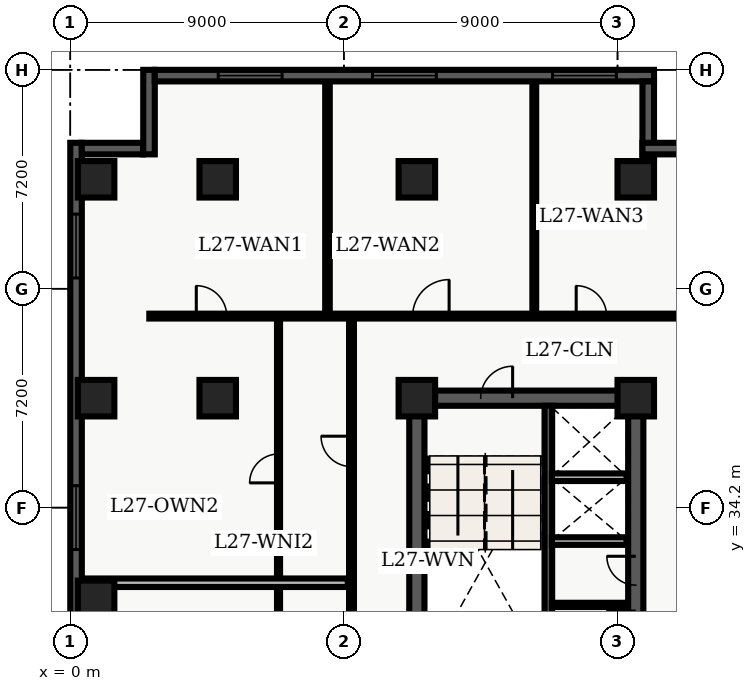
"""IFC4 building model, lengths in metres.
Left out: names, types, materials, properties, quantities, classifications, styles, units other than length and angle.
Written with IfcOpenShell. Run it as: python <this file> out.ifc"""

import sys

from ifc_helpers import new_model, entity, si_unit, converted_unit, direction, frame, origin_with_axes, origin_2d_with_axis, place, context, subcontext, project, spatial, polyline, rectangle, outline, extrude, element, fill, save


model = new_model("IFC4")
c1 = context("Model", 3, precision=1e-05, world=origin_with_axes(), true_north=direction((0.0, 1.0)))
c2 = subcontext(c1, "Body", "Model", "MODEL_VIEW")
j1 = project(units=[si_unit("LENGTHUNIT", "METRE"), converted_unit("PLANEANGLEUNIT", "DEGREE", entity("IfcPlaneAngleMeasure", 0.017), si_unit("PLANEANGLEUNIT", "RADIAN"), dimensions=[0, 0, 0, 0, 0, 0, 0])], contexts=[c1])
p1 = place(None, origin_with_axes())
s1 = spatial("IfcSite", under=j1, at=p1, CompositionType="ELEMENT")
p2 = place(p1, origin_with_axes())
s2 = spatial("IfcBuilding", under=s1, at=p2, CompositionType="ELEMENT")
p3 = place(p2, frame((0.0, 0.0, 112.5), z_axis=(0.0, 0.0, 1.0), x_axis=(1.0, 0.0, 0.0)))
s3 = spatial("IfcBuildingStorey", under=s2, at=p3, CompositionType="ELEMENT", Elevation=112.5)
p4 = place(p3, frame((11.4, 10.8, 0.0), z_axis=(0.0, 0.0, 1.0), x_axis=(0.0, 1.0, 0.0)))
e1 = element("IfcWall", 1, at=p4, inside=s3, PredefinedType="SHEAR", context=c2, shape_type="SweptSolid", body=[
    extrude(outline(polyline([(0.0, -0.25), (27.0, -0.25), (27.0, 0.25), (0.0, 0.25), (0.0, -0.25)])), origin_with_axes(), (0.0, 0.0, 1.0), 3.66),
])
p5 = place(p3, frame((11.4, 37.8, 0.0), z_axis=(0.0, 0.0, 1.0), x_axis=(1.0, 0.0, 0.0)))
e2 = element("IfcWall", 2, at=p5, inside=s3, PredefinedType="SHEAR", context=c2, shape_type="SweptSolid", body=[
    extrude(outline(polyline([(0.0, -0.25), (7.2, -0.25), (7.2, 0.25), (0.0, 0.25), (0.0, -0.25)])), origin_with_axes(), (0.0, 0.0, 1.0), 3.66),
])
p6 = place(p5, frame((2.625, 0.0, 0.0), z_axis=(0.0, 0.0, 1.0), x_axis=(1.0, 0.0, 0.0)))
e3 = element("IfcOpeningElement", 3, at=p6, cuts=e2, PredefinedType="OPENING", context=c2, shape_type="SweptSolid", body=[
    extrude(rectangle(XDim=1.05, YDim=0.52, at=origin_2d_with_axis()), origin_with_axes(), (0.0, 0.0, 1.0), 2.15),
])
p7 = place(p3, frame((18.6, 24.3, 0.0), z_axis=(0.0, 0.0, 1.0), x_axis=(0.0, 1.0, 0.0)))
e4 = element("IfcWall", 4, at=p7, inside=s3, PredefinedType="SHEAR", context=c2, shape_type="SweptSolid", body=[
    extrude(outline(polyline([(0.0, -0.25), (13.5, -0.25), (13.5, 0.25), (0.0, 0.25), (0.0, -0.25)])), origin_with_axes(), (0.0, 0.0, 1.0), 3.66),
])
p8 = place(p7, frame((6.025, 0.0, 0.0), z_axis=(0.0, 0.0, 1.0), x_axis=(1.0, 0.0, 0.0)))
e5 = element("IfcOpeningElement", 5, at=p8, cuts=e4, PredefinedType="OPENING", context=c2, shape_type="SweptSolid", body=[
    extrude(rectangle(XDim=0.95, YDim=0.52, at=origin_2d_with_axis()), origin_with_axes(), (0.0, 0.0, 1.0), 2.15),
])
p9 = place(p7, frame((7.825, 0.0, 0.0), z_axis=(0.0, 0.0, 1.0), x_axis=(1.0, 0.0, 0.0)))
e6 = element("IfcOpeningElement", 6, at=p9, cuts=e4, PredefinedType="OPENING", context=c2, shape_type="SweptSolid", body=[
    extrude(rectangle(XDim=0.95, YDim=0.52, at=origin_2d_with_axis()), origin_with_axes(), (0.0, 0.0, 1.0), 2.15),
])
p10 = place(p3, frame((15.725, 28.9, 0.0), z_axis=(0.0, 0.0, 1.0), x_axis=(0.0, 1.0, 0.0)))
e7 = element("IfcWall", 7, at=p10, inside=s3, PredefinedType="SHEAR", context=c2, shape_type="SweptSolid", body=[
    extrude(outline(polyline([(0.0, -0.125), (8.65, -0.125), (8.65, 0.125), (0.0, 0.125), (0.0, -0.125)])), origin_with_axes(), (0.0, 0.0, 1.0), 3.66),
])
for number, where, z_axis, x_axis in (
    (8, (11.4, 37.8, 0.0), (0.0, 0.0, 1.0), (1.0, 0.0, 0.0)),
    (9, (11.4, 45.0, 0.0), (0.0, 0.0, 1.0), (1.0, 0.0, 0.0)),
    (10, (18.6, 37.8, 0.0), (0.0, 0.0, 1.0), (1.0, 0.0, 0.0)),
    (11, (18.6, 45.0, 0.0), (0.0, 0.0, 1.0), (1.0, 0.0, 0.0)),
    (12, (4.85, 37.8, 0.0), (0.0, 0.0, 1.0), (1.0, 0.0, 0.0)),
    (13, (4.85, 45.0, 0.0), (0.0, 0.0, 1.0), (1.0, 0.0, 0.0)),
    (14, (0.85, 31.2, 0.0), (0.0, 0.0, 1.0), (1.0, 0.0, 0.0)),
    (15, (0.85, 37.8, 0.0), (0.0, 0.0, 1.0), (1.0, 0.0, 0.0)),
    (16, (0.85, 45.0, 0.0), (0.0, 0.0, 1.0), (1.0, 0.0, 0.0)),
):
    element("IfcColumn", number, at=place(p3, frame(where, z_axis=z_axis, x_axis=x_axis)), inside=s3, PredefinedType="COLUMN", context=c2, shape_type="SweptSolid", body=[
        extrude(rectangle(XDim=1.2, YDim=1.2, at=origin_2d_with_axis()), origin_with_axes(), (0.0, 0.0, 1.0), 3.9),
    ])
for number, where, z_axis, x_axis in (
    (17, (15.84, 33.1, 0.0), (0.0, 0.0, 1.0), (1.0, 0.0, 0.0)),
    (18, (15.84, 35.2, 0.0), (0.0, 0.0, 1.0), (1.0, 0.0, 0.0)),
):
    element("IfcWall", number, at=place(p3, frame(where, z_axis=z_axis, x_axis=x_axis)), inside=s3, PredefinedType="SOLIDWALL", context=c2, shape_type="SweptSolid", body=[
        extrude(outline(polyline([(0.0, -0.125), (2.46, -0.125), (2.46, 0.125), (0.0, 0.125), (0.0, -0.125)])), origin_with_axes(), (0.0, 0.0, 1.0), 2.7),
    ])
p11 = place(p3, frame((15.84, 31.0, 0.0), z_axis=(0.0, 0.0, 1.0), x_axis=(1.0, 0.0, 0.0)))
e19 = element("IfcWall", 19, at=p11, inside=s3, PredefinedType="PARTITIONING", context=c2, shape_type="SweptSolid", body=[
    extrude(outline(polyline([(0.0, -0.07), (2.46, -0.07), (2.46, 0.07), (0.0, 0.07), (0.0, -0.07)])), origin_with_axes(), (0.0, 0.0, 1.0), 2.7),
])
p12 = place(p3, frame((2.6, 40.5, 0.0), z_axis=(0.0, 0.0, 1.0), x_axis=(1.0, 0.0, 0.0)))
e20 = element("IfcWall", 20, at=p12, inside=s3, PredefinedType="PARTITIONING", context=c2, shape_type="SweptSolid", body=[
    extrude(outline(polyline([(0.0, -0.08), (18.65, -0.08), (18.65, 0.08), (0.0, 0.08), (0.0, -0.08)])), origin_with_axes(), (0.0, 0.0, 1.0), 2.7),
])
p13 = place(p12, frame((2.045, 0.0, 0.0), z_axis=(0.0, 0.0, 1.0), x_axis=(1.0, 0.0, 0.0)))
e21 = element("IfcOpeningElement", 21, at=p13, cuts=e20, PredefinedType="OPENING", context=c2, shape_type="SweptSolid", body=[
    extrude(rectangle(XDim=1.0, YDim=0.18, at=origin_2d_with_axis()), origin_with_axes(), (0.0, 0.0, 1.0), 2.15),
])
p14 = place(p12, frame((9.261, 0.0, 0.0), z_axis=(0.0, 0.0, 1.0), x_axis=(1.0, 0.0, 0.0)))
e22 = element("IfcOpeningElement", 22, at=p14, cuts=e20, PredefinedType="OPENING", context=c2, shape_type="SweptSolid", body=[
    extrude(rectangle(XDim=1.2, YDim=0.18, at=origin_2d_with_axis()), origin_with_axes(), (0.0, 0.0, 1.0), 2.2),
])
p15 = place(p12, frame((14.541, 0.0, 0.0), z_axis=(0.0, 0.0, 1.0), x_axis=(1.0, 0.0, 0.0)))
e23 = element("IfcOpeningElement", 23, at=p15, cuts=e20, PredefinedType="OPENING", context=c2, shape_type="SweptSolid", body=[
    extrude(rectangle(XDim=1.0, YDim=0.18, at=origin_2d_with_axis()), origin_with_axes(), (0.0, 0.0, 1.0), 2.15),
])
p16 = place(p3, frame((9.25, 24.4, 0.0), z_axis=(0.0, 0.0, 1.0), x_axis=(0.0, 1.0, 0.0)))
e24 = element("IfcWall", 24, at=p16, inside=s3, PredefinedType="PARTITIONING", context=c2, shape_type="SweptSolid", body=[
    extrude(outline(polyline([(0.0, -0.08), (16.1, -0.08), (16.1, 0.08), (0.0, 0.08), (0.0, -0.08)])), origin_with_axes(), (0.0, 0.0, 1.0), 2.7),
])
p17 = place(p16, frame((3.704, 0.0, 0.0), z_axis=(0.0, 0.0, 1.0), x_axis=(1.0, 0.0, 0.0)))
e25 = element("IfcOpeningElement", 25, at=p17, cuts=e24, PredefinedType="OPENING", context=c2, shape_type="SweptSolid", body=[
    extrude(rectangle(XDim=1.0, YDim=0.18, at=origin_2d_with_axis()), origin_with_axes(), (0.0, 0.0, 1.0), 2.15),
])
p18 = place(p16, frame((11.649, 0.0, 0.0), z_axis=(0.0, 0.0, 1.0), x_axis=(1.0, 0.0, 0.0)))
e26 = element("IfcOpeningElement", 26, at=p18, cuts=e24, PredefinedType="OPENING", context=c2, shape_type="SweptSolid", body=[
    extrude(rectangle(XDim=1.0, YDim=0.18, at=origin_2d_with_axis()), origin_with_axes(), (0.0, 0.0, 1.0), 2.15),
])
p19 = place(p3, frame((6.85, 24.55, 0.0), z_axis=(0.0, 0.0, 1.0), x_axis=(0.0, 1.0, 0.0)))
e27 = element("IfcWall", 27, at=p19, inside=s3, PredefinedType="PARTITIONING", context=c2, shape_type="SweptSolid", body=[
    extrude(outline(polyline([(0.0, -0.05), (15.75, -0.05), (15.75, 0.05), (0.0, 0.05), (0.0, -0.05)])), origin_with_axes(), (0.0, 0.0, 1.0), 2.7),
])
p20 = place(p19, frame((3.554, 0.0, 0.0), z_axis=(0.0, 0.0, 1.0), x_axis=(1.0, 0.0, 0.0)))
e28 = element("IfcOpeningElement", 28, at=p20, cuts=e27, PredefinedType="OPENING", context=c2, shape_type="SweptSolid", body=[
    extrude(rectangle(XDim=0.95, YDim=0.12, at=origin_2d_with_axis()), origin_with_axes(), (0.0, 0.0, 1.0), 2.15),
])
p21 = place(p19, frame((10.939, 0.0, 0.0), z_axis=(0.0, 0.0, 1.0), x_axis=(1.0, 0.0, 0.0)))
e29 = element("IfcOpeningElement", 29, at=p21, cuts=e27, PredefinedType="OPENING", context=c2, shape_type="SweptSolid", body=[
    extrude(rectangle(XDim=0.95, YDim=0.12, at=origin_2d_with_axis()), origin_with_axes(), (0.0, 0.0, 1.0), 2.15),
])
p22 = place(p3, frame((0.375, 31.729, 0.0), z_axis=(0.0, 0.0, 1.0), x_axis=(1.0, 0.0, 0.0)))
e30 = element("IfcWall", 30, at=p22, inside=s3, PredefinedType="PARTITIONING", context=c2, shape_type="SweptSolid", body=[
    extrude(outline(polyline([(0.0, -0.14), (8.755, -0.14), (8.755, 0.14), (0.0, 0.14), (0.0, -0.14)])), origin_with_axes(), (0.0, 0.0, 1.0), 2.7),
])
p23 = place(p3, frame((8.46, 40.6, 0.0), z_axis=(0.0, 0.0, 1.0), x_axis=(0.0, 1.0, 0.0)))
e31 = element("IfcWall", 31, at=p23, inside=s3, PredefinedType="PARTITIONING", context=c2, shape_type="SweptSolid", body=[
    extrude(outline(polyline([(0.0, -0.075), (7.64, -0.075), (7.64, 0.075), (0.0, 0.075), (0.0, -0.075)])), origin_with_axes(), (0.0, 0.0, 1.0), 2.7),
])
p24 = place(p3, frame((15.262, 40.6, 0.0), z_axis=(0.0, 0.0, 1.0), x_axis=(0.0, 1.0, 0.0)))
e32 = element("IfcWall", 32, at=p24, inside=s3, PredefinedType="PARTITIONING", context=c2, shape_type="SweptSolid", body=[
    extrude(outline(polyline([(0.0, -0.062), (7.64, -0.062), (7.64, 0.062), (0.0, 0.062), (0.0, -0.062)])), origin_with_axes(), (0.0, 0.0, 1.0), 2.7),
])
p25 = place(p3, frame((0.19, 2.78, 0.0), z_axis=(0.0, 0.0, 1.0), x_axis=(0.0, 1.0, 0.0)))
e33 = element("IfcWall", 33, at=p25, inside=s3, PredefinedType="SOLIDWALL", context=c2, shape_type="SweptSolid", body=[
    extrude(outline(polyline([(0.0, -0.19), (43.42, -0.19), (43.42, 0.19), (0.0, 0.19), (0.0, -0.19)])), origin_with_axes(), (0.0, 0.0, 1.0), 3.66),
])
p26 = place(p25, frame((2.946, 0.0, 0.45), z_axis=(0.0, 0.0, 1.0), x_axis=(1.0, 0.0, 0.0)))
e34 = element("IfcOpeningElement", 34, at=p26, cuts=e33, PredefinedType="OPENING", context=c2, shape_type="SweptSolid", body=[
    extrude(rectangle(XDim=2.1, YDim=0.4, at=origin_2d_with_axis()), origin_with_axes(), (0.0, 0.0, 1.0), 2.2),
])
p27 = place(p25, frame((12.328, 0.0, 0.45), z_axis=(0.0, 0.0, 1.0), x_axis=(1.0, 0.0, 0.0)))
e35 = element("IfcOpeningElement", 35, at=p27, cuts=e33, PredefinedType="OPENING", context=c2, shape_type="SweptSolid", body=[
    extrude(rectangle(XDim=2.1, YDim=0.4, at=origin_2d_with_axis()), origin_with_axes(), (0.0, 0.0, 1.0), 2.2),
])
p28 = place(p25, frame((26.401, 0.0, 0.45), z_axis=(0.0, 0.0, 1.0), x_axis=(1.0, 0.0, 0.0)))
e36 = element("IfcOpeningElement", 36, at=p28, cuts=e33, PredefinedType="OPENING", context=c2, shape_type="SweptSolid", body=[
    extrude(rectangle(XDim=2.1, YDim=0.4, at=origin_2d_with_axis()), origin_with_axes(), (0.0, 0.0, 1.0), 2.2),
])
p29 = place(p25, frame((31.092, 0.0, 0.45), z_axis=(0.0, 0.0, 1.0), x_axis=(1.0, 0.0, 0.0)))
e37 = element("IfcOpeningElement", 37, at=p29, cuts=e33, PredefinedType="OPENING", context=c2, shape_type="SweptSolid", body=[
    extrude(rectangle(XDim=2.1, YDim=0.4, at=origin_2d_with_axis()), origin_with_axes(), (0.0, 0.0, 1.0), 2.2),
])
p30 = place(p25, frame((40.024, 0.0, 0.45), z_axis=(0.0, 0.0, 1.0), x_axis=(1.0, 0.0, 0.0)))
e38 = element("IfcOpeningElement", 38, at=p30, cuts=e33, PredefinedType="OPENING", context=c2, shape_type="SweptSolid", body=[
    extrude(rectangle(XDim=2.1, YDim=0.4, at=origin_2d_with_axis()), origin_with_axes(), (0.0, 0.0, 1.0), 2.2),
])
p31 = place(p3, frame((0.38, 46.01, 0.0), z_axis=(0.0, 0.0, 1.0), x_axis=(1.0, 0.0, 0.0)))
e39 = element("IfcWall", 39, at=p31, inside=s3, PredefinedType="SOLIDWALL", context=c2, shape_type="SweptSolid", body=[
    extrude(outline(polyline([(0.0, -0.19), (2.02, -0.19), (2.02, 0.19), (0.0, 0.19), (0.0, -0.19)])), origin_with_axes(), (0.0, 0.0, 1.0), 3.66),
])
p32 = place(p3, frame((2.59, 45.82, 0.0), z_axis=(0.0, 0.0, 1.0), x_axis=(0.0, 1.0, 0.0)))
e40 = element("IfcWall", 40, at=p32, inside=s3, PredefinedType="SOLIDWALL", context=c2, shape_type="SweptSolid", body=[
    extrude(outline(polyline([(0.0, -0.19), (2.78, -0.19), (2.78, 0.19), (0.0, 0.19), (0.0, -0.19)])), origin_with_axes(), (0.0, 0.0, 1.0), 3.66),
])
p33 = place(p3, frame((2.78, 48.41, 0.0), z_axis=(0.0, 0.0, 1.0), x_axis=(1.0, 0.0, 0.0)))
e41 = element("IfcWall", 41, at=p33, inside=s3, PredefinedType="SOLIDWALL", context=c2, shape_type="SweptSolid", body=[
    extrude(outline(polyline([(0.0, -0.19), (16.42, -0.19), (16.42, 0.19), (0.0, 0.19), (0.0, -0.19)])), origin_with_axes(), (0.0, 0.0, 1.0), 3.66),
])
p34 = place(p33, frame((3.137, 0.0, 0.45), z_axis=(0.0, 0.0, 1.0), x_axis=(1.0, 0.0, 0.0)))
e42 = element("IfcOpeningElement", 42, at=p34, cuts=e41, PredefinedType="OPENING", context=c2, shape_type="SweptSolid", body=[
    extrude(rectangle(XDim=2.1, YDim=0.4, at=origin_2d_with_axis()), origin_with_axes(), (0.0, 0.0, 1.0), 2.2),
])
p35 = place(p33, frame((8.21, 0.0, 0.45), z_axis=(0.0, 0.0, 1.0), x_axis=(1.0, 0.0, 0.0)))
e43 = element("IfcOpeningElement", 43, at=p35, cuts=e41, PredefinedType="OPENING", context=c2, shape_type="SweptSolid", body=[
    extrude(rectangle(XDim=2.1, YDim=0.4, at=origin_2d_with_axis()), origin_with_axes(), (0.0, 0.0, 1.0), 2.2),
])
p36 = place(p33, frame((14.133, 0.0, 0.45), z_axis=(0.0, 0.0, 1.0), x_axis=(1.0, 0.0, 0.0)))
e44 = element("IfcOpeningElement", 44, at=p36, cuts=e41, PredefinedType="OPENING", context=c2, shape_type="SweptSolid", body=[
    extrude(rectangle(XDim=2.1, YDim=0.4, at=origin_2d_with_axis()), origin_with_axes(), (0.0, 0.0, 1.0), 2.2),
])
p37 = place(p3, frame((19.01, 48.22, 0.0), z_axis=(0.0, 0.0, 1.0), x_axis=(0.0, -1.0, 0.0)))
e45 = element("IfcWall", 45, at=p37, inside=s3, PredefinedType="SOLIDWALL", context=c2, shape_type="SweptSolid", body=[
    extrude(outline(polyline([(0.0, -0.19), (2.56, -0.19), (2.56, 0.19), (0.0, 0.19), (0.0, -0.19)])), origin_with_axes(), (0.0, 0.0, 1.0), 3.66),
])
p38 = place(p3, frame((18.82, 46.01, 0.0), z_axis=(0.0, 0.0, 1.0), x_axis=(1.0, 0.0, 0.0)))
e46 = element("IfcWall", 46, at=p38, inside=s3, PredefinedType="SOLIDWALL", context=c2, shape_type="SweptSolid", body=[
    extrude(outline(polyline([(0.0, -0.19), (2.78, -0.19), (2.78, 0.19), (0.0, 0.19), (0.0, -0.19)])), origin_with_axes(), (0.0, 0.0, 1.0), 3.66),
])
p39 = place(p5, frame((2.625, 0.0, 0.0), z_axis=(0.0, 0.0, 1.0), x_axis=(1.0, 0.0, 0.0)))
e47 = element("IfcDoor", 47, at=p39, inside=s3, OperationType="SINGLE_SWING_RIGHT", PredefinedType="DOOR", context=c2, shape_type="SweptSolid", body=[
    extrude(rectangle(XDim=1.05, YDim=0.09, at=origin_2d_with_axis()), origin_with_axes(), (0.0, 0.0, 1.0), 2.15),
])
fill(e3, e47)
p40 = place(p7, frame((7.825, 0.0, 0.0), z_axis=(0.0, 0.0, 1.0), x_axis=(1.0, 0.0, 0.0)))
e48 = element("IfcDoor", 48, at=p40, inside=s3, OperationType="SINGLE_SWING_RIGHT", PredefinedType="DOOR", context=c2, shape_type="SweptSolid", body=[
    extrude(rectangle(XDim=0.95, YDim=0.09, at=origin_2d_with_axis()), origin_with_axes(), (0.0, 0.0, 1.0), 2.15),
])
fill(e6, e48)
p41 = place(p19, frame((10.939, 0.0, 0.0), z_axis=(0.0, 0.0, 1.0), x_axis=(1.0, 0.0, 0.0)))
e49 = element("IfcDoor", 49, at=p41, inside=s3, OperationType="SINGLE_SWING_LEFT", PredefinedType="DOOR", context=c2, shape_type="SweptSolid", body=[
    extrude(rectangle(XDim=0.95, YDim=0.06, at=origin_2d_with_axis()), origin_with_axes(), (0.0, 0.0, 1.0), 2.15),
])
fill(e29, e49)
p42 = place(p16, frame((11.649, 0.0, 0.0), z_axis=(0.0, 0.0, 1.0), x_axis=(1.0, 0.0, 0.0)))
e50 = element("IfcDoor", 50, at=p42, inside=s3, OperationType="SINGLE_SWING_RIGHT", PredefinedType="DOOR", context=c2, shape_type="SweptSolid", body=[
    extrude(rectangle(XDim=1.0, YDim=0.09, at=origin_2d_with_axis()), origin_with_axes(), (0.0, 0.0, 1.0), 2.15),
])
fill(e26, e50)
p43 = place(p12, frame((2.045, 0.0, 0.0), z_axis=(0.0, 0.0, 1.0), x_axis=(1.0, 0.0, 0.0)))
e51 = element("IfcDoor", 51, at=p43, inside=s3, OperationType="SINGLE_SWING_LEFT", PredefinedType="DOOR", context=c2, shape_type="SweptSolid", body=[
    extrude(rectangle(XDim=1.0, YDim=0.09, at=origin_2d_with_axis()), origin_with_axes(), (0.0, 0.0, 1.0), 2.15),
])
fill(e21, e51)
p44 = place(p12, frame((9.261, 0.0, 0.0), z_axis=(0.0, 0.0, 1.0), x_axis=(1.0, 0.0, 0.0)))
e52 = element("IfcDoor", 52, at=p44, inside=s3, OperationType="SINGLE_SWING_RIGHT", PredefinedType="DOOR", context=c2, shape_type="SweptSolid", body=[
    extrude(rectangle(XDim=1.2, YDim=0.09, at=origin_2d_with_axis()), origin_with_axes(), (0.0, 0.0, 1.0), 2.2),
])
fill(e22, e52)
p45 = place(p12, frame((14.541, 0.0, 0.0), z_axis=(0.0, 0.0, 1.0), x_axis=(1.0, 0.0, 0.0)))
e53 = element("IfcDoor", 53, at=p45, inside=s3, OperationType="SINGLE_SWING_LEFT", PredefinedType="DOOR", context=c2, shape_type="SweptSolid", body=[
    extrude(rectangle(XDim=1.0, YDim=0.09, at=origin_2d_with_axis()), origin_with_axes(), (0.0, 0.0, 1.0), 2.15),
])
fill(e23, e53)
p46 = place(p25, frame((31.092, 0.0, 0.45), z_axis=(0.0, 0.0, 1.0), x_axis=(1.0, 0.0, 0.0)))
e54 = element("IfcWindow", 54, at=p46, inside=s3, PredefinedType="WINDOW", context=c2, shape_type="SweptSolid", body=[
    extrude(rectangle(XDim=2.1, YDim=0.09, at=origin_2d_with_axis()), origin_with_axes(), (0.0, 0.0, 1.0), 2.2),
])
fill(e37, e54)
p47 = place(p25, frame((40.024, 0.0, 0.45), z_axis=(0.0, 0.0, 1.0), x_axis=(1.0, 0.0, 0.0)))
e55 = element("IfcWindow", 55, at=p47, inside=s3, PredefinedType="WINDOW", context=c2, shape_type="SweptSolid", body=[
    extrude(rectangle(XDim=2.1, YDim=0.09, at=origin_2d_with_axis()), origin_with_axes(), (0.0, 0.0, 1.0), 2.2),
])
fill(e38, e55)
p48 = place(p33, frame((3.137, 0.0, 0.45), z_axis=(0.0, 0.0, 1.0), x_axis=(1.0, 0.0, 0.0)))
e56 = element("IfcWindow", 56, at=p48, inside=s3, PredefinedType="WINDOW", context=c2, shape_type="SweptSolid", body=[
    extrude(rectangle(XDim=2.1, YDim=0.09, at=origin_2d_with_axis()), origin_with_axes(), (0.0, 0.0, 1.0), 2.2),
])
fill(e42, e56)
p49 = place(p33, frame((8.21, 0.0, 0.45), z_axis=(0.0, 0.0, 1.0), x_axis=(1.0, 0.0, 0.0)))
e57 = element("IfcWindow", 57, at=p49, inside=s3, PredefinedType="WINDOW", context=c2, shape_type="SweptSolid", body=[
    extrude(rectangle(XDim=2.1, YDim=0.09, at=origin_2d_with_axis()), origin_with_axes(), (0.0, 0.0, 1.0), 2.2),
])
fill(e43, e57)
p50 = place(p33, frame((14.133, 0.0, 0.45), z_axis=(0.0, 0.0, 1.0), x_axis=(1.0, 0.0, 0.0)))
e58 = element("IfcWindow", 58, at=p50, inside=s3, PredefinedType="WINDOW", context=c2, shape_type="SweptSolid", body=[
    extrude(rectangle(XDim=2.1, YDim=0.09, at=origin_2d_with_axis()), origin_with_axes(), (0.0, 0.0, 1.0), 2.2),
])
fill(e44, e58)
save(model, sys.argv[1])
